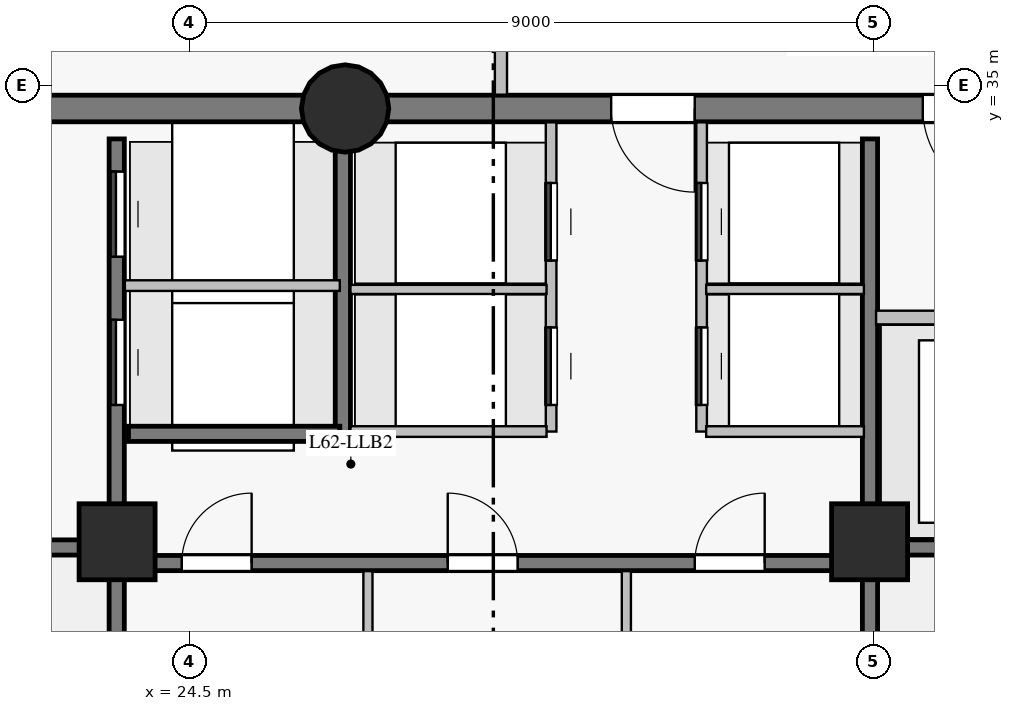
"""IFC4 building model, lengths in metres.
Left out: names, types, materials, properties, quantities, classifications, styles, units other than length and angle.
Written with IfcOpenShell. Run it as: python <this file> out.ifc"""

import sys

from ifc_helpers import new_model, si_unit, direction, frame, frame_2d, origin, origin_with_axes, origin_2d, place, context, subcontext, project, spatial, rectangle, circle, extrude, source, transform, mapped, element, fill, save


model = new_model("IFC4")
c1 = context("Model", 3, precision=1e-05, world=origin(), true_north=direction((0.0, 1.0)))
c2 = subcontext(c1, "Body", "Model", "MODEL_VIEW")
j1 = project(units=[si_unit("LENGTHUNIT", "METRE"), si_unit("PLANEANGLEUNIT", "RADIAN")], contexts=[c1])
p1 = place(None, origin())
s1 = spatial("IfcSite", under=j1, at=p1, CompositionType="ELEMENT")
p2 = place(p1, origin())
s2 = spatial("IfcBuilding", under=s1, at=p2, CompositionType="ELEMENT")
p3 = place(p2, frame((0.0, 0.0, 212.9)))
s3 = spatial("IfcBuildingStorey", under=s2, at=p3, CompositionType="ELEMENT", Elevation=212.9)
p4 = place(p3, frame((37.5, 34.7, 0.0), z_axis=(0.0, 0.0, 1.0), x_axis=(-1.0, 0.0, 0.0)))
e1 = element("IfcWall", 1, at=p4, inside=s3, PredefinedType="SHEAR", context=c2, shape_type="SweptSolid", body=[
    extrude(rectangle(XDim=10.95, YDim=0.35, at=frame_2d((5.475, 0.0))), origin(), (0.0, 0.0, 1.0), 3.8),
])
p5 = place(p4, frame((2.15, 0.0, 0.0)))
e2 = element("IfcOpeningElement", 2, at=p5, cuts=e1, PredefinedType="OPENING", context=c2, shape_type="SweptSolid", body=[
    extrude(rectangle(XDim=1.2, YDim=2.15, at=frame_2d((0.6, 1.075))), frame((0.0, 0.185, 0.0), z_axis=(0.0, -1.0, 0.0), x_axis=(1.0, 0.0, 0.0)), (0.0, 0.0, 1.0), 0.37),
])
p6 = place(p4, frame((6.35, 0.0, 0.0)))
e3 = element("IfcOpeningElement", 3, at=p6, cuts=e1, PredefinedType="OPENING", context=c2, shape_type="SweptSolid", body=[
    extrude(rectangle(XDim=1.1, YDim=2.15, at=frame_2d((0.55, 1.075))), frame((0.0, 0.185, 0.0), z_axis=(0.0, -1.0, 0.0), x_axis=(1.0, 0.0, 0.0)), (0.0, 0.0, 1.0), 0.37),
])
p7 = place(p3, frame((26.55, 34.7, 0.0), z_axis=(0.0, 0.0, 1.0), x_axis=(-1.0, 0.0, 0.0)))
e4 = element("IfcWall", 4, at=p7, inside=s3, PredefinedType="SHEAR", context=c2, shape_type="SweptSolid", body=[
    extrude(rectangle(XDim=7.05, YDim=0.35, at=frame_2d((3.525, 0.0))), origin(), (0.0, 0.0, 1.0), 3.8),
])
m1 = source(origin_with_axes(), c2, "Body", "SweptSolid", [
    extrude(circle(Radius=0.575, at=origin_2d()), origin(), (0.0, 0.0, 1.0), 4.0),
])
p8 = place(p3, frame((26.55, 34.7, 0.0), z_axis=(0.0, 0.0, 1.0), x_axis=(1.0, 0.0, 0.0)))
e5 = element("IfcColumn", 5, at=p8, inside=s3, PredefinedType="COLUMN", context=c2, shape_type="MappedRepresentation", body=[
    mapped(m1, transform((0.0, 0.0, 0.0), scale=1.0)),
])
m2 = source(origin_with_axes(), c2, "Body", "SweptSolid", [
    extrude(rectangle(XDim=1.0, YDim=1.0, at=origin_2d()), origin(), (0.0, 0.0, 1.0), 4.0),
])
for number, where, z_axis, x_axis in (
    (6, (23.55, 29.0, 0.0), (0.0, 0.0, 1.0), (1.0, 0.0, 0.0)),
    (7, (33.45, 29.0, 0.0), (0.0, 0.0, 1.0), (1.0, 0.0, 0.0)),
):
    element("IfcColumn", number, at=place(p3, frame(where, z_axis=z_axis, x_axis=x_axis)), inside=s3, PredefinedType="COLUMN", context=c2, shape_type="MappedRepresentation", body=[
        mapped(m2, transform((0.0, 0.0, 0.0), scale=1.0)),
    ])
p9 = place(p3, frame((23.545, 18.7, 0.0), z_axis=(0.0, 0.0, 1.0), x_axis=(0.0, 1.0, 0.0)))
e8 = element("IfcWall", 8, at=p9, inside=s3, PredefinedType="SHEAR", context=c2, shape_type="SweptSolid", body=[
    extrude(rectangle(XDim=15.6, YDim=0.2, at=frame_2d((7.8, 0.0))), origin(), (0.0, 0.0, 1.0), 3.8),
])
p10 = place(p9, frame((2.75, 0.0, 0.0)))
e9 = element("IfcOpeningElement", 9, at=p10, cuts=e8, PredefinedType="OPENING", context=c2, shape_type="SweptSolid", body=[
    extrude(rectangle(XDim=1.15, YDim=2.15, at=frame_2d((0.575, 1.075))), frame((0.0, 0.11, 0.0), z_axis=(0.0, -1.0, 0.0), x_axis=(1.0, 0.0, 0.0)), (0.0, 0.0, 1.0), 0.22),
])
p11 = place(p9, frame((0.14, 0.0, 0.0)))
e10 = element("IfcOpeningElement", 10, at=p11, cuts=e8, PredefinedType="OPENING", context=c2, shape_type="SweptSolid", body=[
    extrude(rectangle(XDim=0.88, YDim=2.1, at=frame_2d((0.44, 1.05))), frame((0.0, 0.11, 0.0), z_axis=(0.0, -1.0, 0.0), x_axis=(1.0, 0.0, 0.0)), (0.0, 0.0, 1.0), 0.22),
])
p12 = place(p9, frame((1.36, 0.0, 0.0)))
e11 = element("IfcOpeningElement", 11, at=p12, cuts=e8, PredefinedType="OPENING", context=c2, shape_type="SweptSolid", body=[
    extrude(rectangle(XDim=0.88, YDim=2.1, at=frame_2d((0.44, 1.05))), frame((0.0, 0.11, 0.0), z_axis=(0.0, -1.0, 0.0), x_axis=(1.0, 0.0, 0.0)), (0.0, 0.0, 1.0), 0.22),
])
p13 = place(p9, frame((12.1, 0.0, 0.0)))
e12 = element("IfcOpeningElement", 12, at=p13, cuts=e8, PredefinedType="OPENING", context=c2, shape_type="SweptSolid", body=[
    extrude(rectangle(XDim=1.12, YDim=2.15, at=frame_2d((0.56, 1.075))), frame((0.0, 0.11, 0.0), z_axis=(0.0, -1.0, 0.0), x_axis=(1.0, 0.0, 0.0)), (0.0, 0.0, 1.0), 0.22),
])
p14 = place(p9, frame((14.05, 0.0, 0.0)))
e13 = element("IfcOpeningElement", 13, at=p14, cuts=e8, PredefinedType="OPENING", context=c2, shape_type="SweptSolid", body=[
    extrude(rectangle(XDim=1.12, YDim=2.15, at=frame_2d((0.56, 1.075))), frame((0.0, 0.11, 0.0), z_axis=(0.0, -1.0, 0.0), x_axis=(1.0, 0.0, 0.0)), (0.0, 0.0, 1.0), 0.22),
])
p15 = place(p3, frame((33.455, 18.7, 0.0), z_axis=(0.0, 0.0, 1.0), x_axis=(0.0, 1.0, 0.0)))
e14 = element("IfcWall", 14, at=p15, inside=s3, PredefinedType="SHEAR", context=c2, shape_type="SweptSolid", body=[
    extrude(rectangle(XDim=15.6, YDim=0.2, at=frame_2d((7.8, 0.0))), origin(), (0.0, 0.0, 1.0), 3.8),
])
p16 = place(p15, frame((2.75, 0.0, 0.0)))
e15 = element("IfcOpeningElement", 15, at=p16, cuts=e14, PredefinedType="OPENING", context=c2, shape_type="SweptSolid", body=[
    extrude(rectangle(XDim=1.15, YDim=2.15, at=frame_2d((0.575, 1.075))), frame((0.0, 0.11, 0.0), z_axis=(0.0, -1.0, 0.0), x_axis=(1.0, 0.0, 0.0)), (0.0, 0.0, 1.0), 0.22),
])
p17 = place(p15, frame((0.55, 0.0, 0.0)))
e16 = element("IfcOpeningElement", 16, at=p17, cuts=e14, PredefinedType="OPENING", context=c2, shape_type="SweptSolid", body=[
    extrude(rectangle(XDim=0.94, YDim=2.1, at=frame_2d((0.47, 1.05))), frame((0.0, 0.11, 0.0), z_axis=(0.0, -1.0, 0.0), x_axis=(1.0, 0.0, 0.0)), (0.0, 0.0, 1.0), 0.22),
])
p18 = place(p3, frame((23.7, 28.72, 0.0), z_axis=(0.0, 0.0, 1.0), x_axis=(1.0, 0.0, 0.0)))
e17 = element("IfcWall", 17, at=p18, inside=s3, PredefinedType="SHEAR", context=c2, shape_type="SweptSolid", body=[
    extrude(rectangle(XDim=9.6, YDim=0.2, at=frame_2d((4.8, 0.0))), origin(), (0.0, 0.0, 1.0), 3.8),
])
p19 = place(p18, frame((0.7, 0.0, 0.0)))
e18 = element("IfcOpeningElement", 18, at=p19, cuts=e17, PredefinedType="OPENING", context=c2, shape_type="SweptSolid", body=[
    extrude(rectangle(XDim=0.92, YDim=2.1, at=frame_2d((0.46, 1.05))), frame((0.0, 0.11, 0.0), z_axis=(0.0, -1.0, 0.0), x_axis=(1.0, 0.0, 0.0)), (0.0, 0.0, 1.0), 0.22),
])
p20 = place(p18, frame((4.2, 0.0, 0.0)))
e19 = element("IfcOpeningElement", 19, at=p20, cuts=e17, PredefinedType="OPENING", context=c2, shape_type="SweptSolid", body=[
    extrude(rectangle(XDim=0.92, YDim=2.1, at=frame_2d((0.46, 1.05))), frame((0.0, 0.11, 0.0), z_axis=(0.0, -1.0, 0.0), x_axis=(1.0, 0.0, 0.0)), (0.0, 0.0, 1.0), 0.22),
])
p21 = place(p18, frame((7.45, 0.0, 0.0)))
e20 = element("IfcOpeningElement", 20, at=p21, cuts=e17, PredefinedType="OPENING", context=c2, shape_type="SweptSolid", body=[
    extrude(rectangle(XDim=0.92, YDim=2.1, at=frame_2d((0.46, 1.05))), frame((0.0, 0.11, 0.0), z_axis=(0.0, -1.0, 0.0), x_axis=(1.0, 0.0, 0.0)), (0.0, 0.0, 1.0), 0.22),
])
for number, where, z_axis, x_axis in (
    (21, (33.455, 28.925, 0.0), (0.0, 0.0, 1.0), (1.0, 0.0, 0.0)),
    (22, (19.55, 28.925, 0.0), (0.0, 0.0, 1.0), (1.0, 0.0, 0.0)),
):
    element("IfcWall", number, at=place(p3, frame(where, z_axis=z_axis, x_axis=x_axis)), inside=s3, PredefinedType="SHEAR", context=c2, shape_type="SweptSolid", body=[
        extrude(rectangle(XDim=3.995, YDim=0.2, at=frame_2d((1.998, 0.0))), origin(), (0.0, 0.0, 1.0), 3.8),
    ])
p22 = place(p3, frame((26.52, 30.42, 0.0), z_axis=(0.0, 0.0, 1.0), x_axis=(0.0, 1.0, 0.0)))
e23 = element("IfcWall", 23, at=p22, inside=s3, PredefinedType="SHEAR", context=c2, shape_type="SweptSolid", body=[
    extrude(rectangle(XDim=3.86, YDim=0.2, at=frame_2d((1.93, 0.0))), origin(), (0.0, 0.0, 1.0), 3.8),
])
p23 = place(p3, frame((23.7, 30.42, 0.0), z_axis=(0.0, 0.0, 1.0), x_axis=(1.0, 0.0, 0.0)))
e24 = element("IfcWall", 24, at=p23, inside=s3, PredefinedType="SHEAR", context=c2, shape_type="SweptSolid", body=[
    extrude(rectangle(XDim=2.78, YDim=0.2, at=frame_2d((1.39, 0.0))), origin(), (0.0, 0.0, 1.0), 3.8),
])
p24 = place(p3, frame((29.26, 30.45, 0.0), z_axis=(0.0, 0.0, 1.0), x_axis=(0.0, 1.0, 0.0)))
e25 = element("IfcWall", 25, at=p24, inside=s3, PredefinedType="PARTITIONING", context=c2, shape_type="SweptSolid", body=[
    extrude(rectangle(XDim=4.068, YDim=0.14, at=frame_2d((2.034, 0.0))), origin(), (0.0, 0.0, 1.0), 3.8),
])
p25 = place(p24, frame((0.35, 0.0, 0.0)))
e26 = element("IfcOpeningElement", 26, at=p25, cuts=e25, PredefinedType="OPENING", context=c2, shape_type="SweptSolid", body=[
    extrude(rectangle(XDim=1.02, YDim=2.15, at=frame_2d((0.51, 1.075))), frame((0.0, 0.08, 0.0), z_axis=(0.0, -1.0, 0.0), x_axis=(1.0, 0.0, 0.0)), (0.0, 0.0, 1.0), 0.16),
])
p26 = place(p24, frame((2.25, 0.0, 0.0)))
e27 = element("IfcOpeningElement", 27, at=p26, cuts=e25, PredefinedType="OPENING", context=c2, shape_type="SweptSolid", body=[
    extrude(rectangle(XDim=1.02, YDim=2.15, at=frame_2d((0.51, 1.075))), frame((0.0, 0.08, 0.0), z_axis=(0.0, -1.0, 0.0), x_axis=(1.0, 0.0, 0.0)), (0.0, 0.0, 1.0), 0.16),
])
p27 = place(p3, frame((31.24, 30.45, 0.0), z_axis=(0.0, 0.0, 1.0), x_axis=(0.0, 1.0, 0.0)))
e28 = element("IfcWall", 28, at=p27, inside=s3, PredefinedType="PARTITIONING", context=c2, shape_type="SweptSolid", body=[
    extrude(rectangle(XDim=4.068, YDim=0.14, at=frame_2d((2.034, 0.0))), origin(), (0.0, 0.0, 1.0), 3.8),
])
p28 = place(p27, frame((0.35, 0.0, 0.0)))
e29 = element("IfcOpeningElement", 29, at=p28, cuts=e28, PredefinedType="OPENING", context=c2, shape_type="SweptSolid", body=[
    extrude(rectangle(XDim=1.02, YDim=2.15, at=frame_2d((0.51, 1.075))), frame((0.0, 0.08, 0.0), z_axis=(0.0, -1.0, 0.0), x_axis=(1.0, 0.0, 0.0)), (0.0, 0.0, 1.0), 0.16),
])
p29 = place(p27, frame((2.25, 0.0, 0.0)))
e30 = element("IfcOpeningElement", 30, at=p29, cuts=e28, PredefinedType="OPENING", context=c2, shape_type="SweptSolid", body=[
    extrude(rectangle(XDim=1.02, YDim=2.15, at=frame_2d((0.51, 1.075))), frame((0.0, 0.08, 0.0), z_axis=(0.0, -1.0, 0.0), x_axis=(1.0, 0.0, 0.0)), (0.0, 0.0, 1.0), 0.16),
])
p30 = place(p3, frame((33.535, 31.95, 0.0), z_axis=(0.0, 0.0, 1.0), x_axis=(1.0, 0.0, 0.0)))
e31 = element("IfcWall", 31, at=p30, inside=s3, PredefinedType="PARTITIONING", context=c2, shape_type="SweptSolid", body=[
    extrude(rectangle(XDim=3.784, YDim=0.18, at=frame_2d((1.892, 0.0))), origin(), (0.0, 0.0, 1.0), 3.8),
])
p31 = place(p30, frame((0.9, 0.0, 0.0)))
e32 = element("IfcOpeningElement", 32, at=p31, cuts=e31, PredefinedType="OPENING", context=c2, shape_type="SweptSolid", body=[
    extrude(rectangle(XDim=1.3, YDim=2.2, at=frame_2d((0.65, 1.1))), frame((0.0, 0.1, 0.0), z_axis=(0.0, -1.0, 0.0), x_axis=(1.0, 0.0, 0.0)), (0.0, 0.0, 1.0), 0.2),
])
p32 = place(p3, frame((23.652, 32.37, 0.0), z_axis=(0.0, 0.0, 1.0), x_axis=(1.0, 0.0, 0.0)))
e33 = element("IfcWall", 33, at=p32, inside=s3, PredefinedType="PARTITIONING", context=c2, shape_type="SweptSolid", body=[
    extrude(rectangle(XDim=2.828, YDim=0.14, at=frame_2d((1.414, 0.0))), origin(), (0.0, 0.0, 1.0), 3.8),
])
p33 = place(p3, frame((26.62, 30.45, 0.0), z_axis=(0.0, 0.0, 1.0), x_axis=(1.0, 0.0, 0.0)))
e34 = element("IfcWall", 34, at=p33, inside=s3, PredefinedType="PARTITIONING", context=c2, shape_type="SweptSolid", body=[
    extrude(rectangle(XDim=2.58, YDim=0.14, at=frame_2d((1.29, 0.0))), origin(), (0.0, 0.0, 1.0), 3.8),
])
p34 = place(p3, frame((26.62, 32.32, 0.0), z_axis=(0.0, 0.0, 1.0), x_axis=(1.0, 0.0, 0.0)))
e35 = element("IfcWall", 35, at=p34, inside=s3, PredefinedType="PARTITIONING", context=c2, shape_type="SweptSolid", body=[
    extrude(rectangle(XDim=2.58, YDim=0.12, at=frame_2d((1.29, 0.0))), origin(), (0.0, 0.0, 1.0), 3.8),
])
for number, where, z_axis, x_axis in (
    (36, (26.85, 26.027, 0.0), (0.0, 0.0, 1.0), (0.0, 1.0, 0.0)),
    (37, (30.25, 26.027, 0.0), (0.0, 0.0, 1.0), (0.0, 1.0, 0.0)),
):
    element("IfcWall", number, at=place(p3, frame(where, z_axis=z_axis, x_axis=x_axis)), inside=s3, PredefinedType="PARTITIONING", context=c2, shape_type="SweptSolid", body=[
        extrude(rectangle(XDim=2.587, YDim=0.12, at=frame_2d((1.293, 0.0))), origin(), (0.0, 0.0, 1.0), 3.8),
    ])
p35 = place(p3, frame((31.3, 30.45, 0.0), z_axis=(0.0, 0.0, 1.0), x_axis=(1.0, 0.0, 0.0)))
e38 = element("IfcWall", 38, at=p35, inside=s3, PredefinedType="PARTITIONING", context=c2, shape_type="SweptSolid", body=[
    extrude(rectangle(XDim=2.075, YDim=0.14, at=frame_2d((1.038, 0.0))), origin(), (0.0, 0.0, 1.0), 3.8),
])
p36 = place(p3, frame((31.3, 32.32, 0.0), z_axis=(0.0, 0.0, 1.0), x_axis=(1.0, 0.0, 0.0)))
e39 = element("IfcWall", 39, at=p36, inside=s3, PredefinedType="PARTITIONING", context=c2, shape_type="SweptSolid", body=[
    extrude(rectangle(XDim=2.075, YDim=0.12, at=frame_2d((1.038, 0.0))), origin(), (0.0, 0.0, 1.0), 3.8),
])
p37 = place(p3, frame((28.6, 34.882, 0.0), z_axis=(0.0, 0.0, 1.0), x_axis=(0.0, 1.0, 0.0)))
e40 = element("IfcWall", 40, at=p37, inside=s3, PredefinedType="PARTITIONING", context=c2, shape_type="SweptSolid", body=[
    extrude(rectangle(XDim=1.518, YDim=0.16, at=frame_2d((0.759, 0.0))), origin(), (0.0, 0.0, 1.0), 3.8),
])
m3 = source(origin_with_axes(), c2, "Body", "SweptSolid", [
    extrude(rectangle(XDim=1.2, YDim=2.15, at=frame_2d((0.6, 1.075))), frame((0.0, 0.025, 0.0), z_axis=(0.0, -1.0, 0.0), x_axis=(1.0, 0.0, 0.0)), (0.0, 0.0, 1.0), 0.05),
])
p38 = place(p5, origin())
e41 = element("IfcDoor", 41, at=p38, inside=s3, OperationType="SINGLE_SWING_LEFT", PredefinedType="DOOR", context=c2, shape_type="MappedRepresentation", body=[
    mapped(m3, transform((0.0, 0.0, 0.0), scale=1.0)),
])
fill(e2, e41)
m4 = source(origin_with_axes(), c2, "Body", "SweptSolid", [
    extrude(rectangle(XDim=0.92, YDim=2.1, at=frame_2d((0.46, 1.05))), frame((0.0, 0.025, 0.0), z_axis=(0.0, -1.0, 0.0), x_axis=(1.0, 0.0, 0.0)), (0.0, 0.0, 1.0), 0.05),
])
p39 = place(p19, origin())
e42 = element("IfcDoor", 42, at=p39, inside=s3, OperationType="SINGLE_SWING_RIGHT", PredefinedType="DOOR", context=c2, shape_type="MappedRepresentation", body=[
    mapped(m4, transform((0.0, 0.0, 0.0), scale=1.0)),
])
fill(e18, e42)
p40 = place(p20, origin())
e43 = element("IfcDoor", 43, at=p40, inside=s3, OperationType="SINGLE_SWING_LEFT", PredefinedType="DOOR", context=c2, shape_type="MappedRepresentation", body=[
    mapped(m4, transform((0.0, 0.0, 0.0), scale=1.0)),
])
fill(e19, e43)
p41 = place(p21, origin())
e44 = element("IfcDoor", 44, at=p41, inside=s3, OperationType="SINGLE_SWING_RIGHT", PredefinedType="DOOR", context=c2, shape_type="MappedRepresentation", body=[
    mapped(m4, transform((0.0, 0.0, 0.0), scale=1.0)),
])
fill(e20, e44)
m5 = source(origin_with_axes(), c2, "Body", "SweptSolid", [
    extrude(rectangle(XDim=1.1, YDim=2.15, at=frame_2d((0.55, 1.075))), frame((0.0, 0.025, 0.0), z_axis=(0.0, -1.0, 0.0), x_axis=(1.0, 0.0, 0.0)), (0.0, 0.0, 1.0), 0.05),
])
p42 = place(p6, origin())
e45 = element("IfcDoor", 45, at=p42, inside=s3, OperationType="SINGLE_SWING_LEFT", PredefinedType="DOOR", context=c2, shape_type="MappedRepresentation", body=[
    mapped(m5, transform((0.0, 0.0, 0.0), scale=1.0)),
])
fill(e3, e45)
m6 = source(origin_with_axes(), c2, "Body", "SweptSolid", [
    extrude(rectangle(XDim=1.12, YDim=2.15, at=frame_2d((0.56, 1.075))), frame((0.0, 0.025, 0.0), z_axis=(0.0, -1.0, 0.0), x_axis=(1.0, 0.0, 0.0)), (0.0, 0.0, 1.0), 0.05),
])
p43 = place(p13, origin())
e46 = element("IfcDoor", 46, at=p43, inside=s3, OperationType="SLIDING_TO_LEFT", PredefinedType="DOOR", context=c2, shape_type="MappedRepresentation", body=[
    mapped(m6, transform((0.0, 0.0, 0.0), scale=1.0)),
])
fill(e12, e46)
p44 = place(p14, origin())
e47 = element("IfcDoor", 47, at=p44, inside=s3, OperationType="SLIDING_TO_RIGHT", PredefinedType="DOOR", context=c2, shape_type="MappedRepresentation", body=[
    mapped(m6, transform((0.0, 0.0, 0.0), scale=1.0)),
])
fill(e13, e47)
m7 = source(origin_with_axes(), c2, "Body", "SweptSolid", [
    extrude(rectangle(XDim=1.02, YDim=2.15, at=frame_2d((0.51, 1.075))), frame((0.0, 0.025, 0.0), z_axis=(0.0, -1.0, 0.0), x_axis=(1.0, 0.0, 0.0)), (0.0, 0.0, 1.0), 0.05),
])
p45 = place(p25, origin())
e48 = element("IfcDoor", 48, at=p45, inside=s3, OperationType="SLIDING_TO_LEFT", PredefinedType="DOOR", context=c2, shape_type="MappedRepresentation", body=[
    mapped(m7, transform((0.0, 0.0, 0.0), scale=1.0)),
])
fill(e26, e48)
p46 = place(p26, origin())
e49 = element("IfcDoor", 49, at=p46, inside=s3, OperationType="SLIDING_TO_LEFT", PredefinedType="DOOR", context=c2, shape_type="MappedRepresentation", body=[
    mapped(m7, transform((0.0, 0.0, 0.0), scale=1.0)),
])
fill(e27, e49)
p47 = place(p28, origin())
e50 = element("IfcDoor", 50, at=p47, inside=s3, OperationType="SLIDING_TO_LEFT", PredefinedType="DOOR", context=c2, shape_type="MappedRepresentation", body=[
    mapped(m7, transform((0.0, 0.0, 0.0), scale=1.0)),
])
fill(e29, e50)
p48 = place(p29, origin())
e51 = element("IfcDoor", 51, at=p48, inside=s3, OperationType="SLIDING_TO_LEFT", PredefinedType="DOOR", context=c2, shape_type="MappedRepresentation", body=[
    mapped(m7, transform((0.0, 0.0, 0.0), scale=1.0)),
])
fill(e30, e51)
save(model, sys.argv[1])
